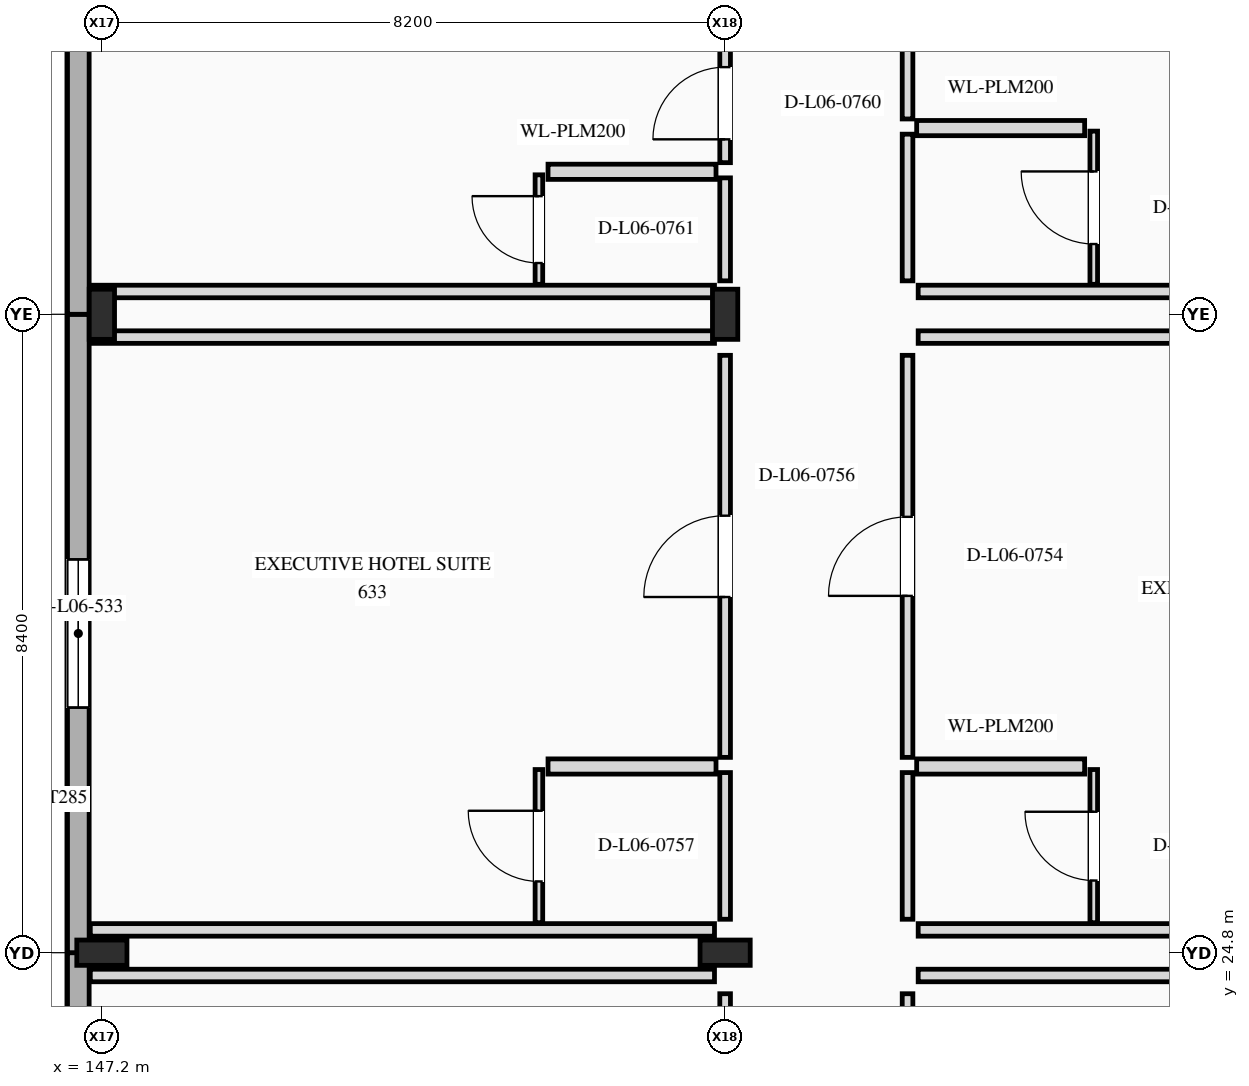
"""IFC4 building model, lengths in metres.
Left out: names, types, materials, properties, quantities, classifications, styles, units other than length and angle.
Written with IfcOpenShell. Run it as: python <this file> out.ifc"""

import sys

from ifc_helpers import new_model, si_unit, direction, frame, frame_2d, origin, origin_2d, place, context, subcontext, project, spatial, rectangle, i_section, extrude, element, fill, save


model = new_model("IFC4")
c1 = context("Model", 3, precision=1e-05, world=origin(), true_north=direction((0.0, 1.0)))
c2 = subcontext(c1, "Body", "Model", "MODEL_VIEW")
j1 = project(units=[si_unit("LENGTHUNIT", "METRE"), si_unit("PLANEANGLEUNIT", "RADIAN")], contexts=[c1])
p1 = place(None, origin())
s1 = spatial("IfcSite", under=j1, at=p1, CompositionType="ELEMENT")
p2 = place(p1, origin())
s2 = spatial("IfcBuilding", under=s1, at=p2, CompositionType="ELEMENT")
p3 = place(p2, frame((0.0, 0.0, 27.0)))
s3 = spatial("IfcBuildingStorey", under=s2, at=p3, CompositionType="ELEMENT", Elevation=27.0)
for number, where, z_axis, x_axis in (
    (1, (147.2, 24.8, 0.0), (0.0, 0.0, 1.0), (0.0, 1.0, 0.0)),
    (2, (147.2, 33.2, 0.0), (0.0, 0.0, 1.0), (1.0, 0.0, 0.0)),
    (3, (155.4, 24.8, 0.0), (0.0, 0.0, 1.0), (0.0, 1.0, 0.0)),
    (4, (155.4, 33.2, 0.0), (0.0, 0.0, 1.0), (1.0, 0.0, 0.0)),
):
    element("IfcColumn", number, at=place(p3, frame(where, z_axis=z_axis, x_axis=x_axis)), inside=s3, PredefinedType="COLUMN", context=c2, shape_type="SweptSolid", body=[
        extrude(i_section(OverallWidth=0.333, OverallDepth=0.66, WebThickness=0.024, FlangeThickness=0.044, at=origin_2d()), origin(), (0.0, 0.0, 1.0), 3.6),
    ])
p4 = place(p3, frame((146.89, 19.254, 0.0), z_axis=(0.0, 0.0, 1.0), x_axis=(0.0, 1.0, 0.0)))
e5 = element("IfcWall", 5, at=p4, inside=s3, PredefinedType="STANDARD", context=c2, shape_type="SweptSolid", body=[
    extrude(rectangle(XDim=5.546, YDim=0.285, at=frame_2d((2.773, 0.0))), origin(), (0.0, 0.0, 1.0), 3.6),
])
p5 = place(p4, frame((1.698, 0.0, 0.85)))
e6 = element("IfcOpeningElement", 6, at=p5, cuts=e5, PredefinedType="OPENING", context=c2, shape_type="SweptSolid", body=[
    extrude(rectangle(XDim=1.8, YDim=1.8, at=frame_2d((0.9, 0.9))), frame((0.0, 0.152, 0.0), z_axis=(0.0, -1.0, 0.0), x_axis=(1.0, 0.0, 0.0)), (0.0, 0.0, 1.0), 0.305),
])
p6 = place(p3, frame((146.89, 24.8, 0.0), z_axis=(0.0, 0.0, 1.0), x_axis=(0.0, 1.0, 0.0)))
e7 = element("IfcWall", 7, at=p6, inside=s3, PredefinedType="STANDARD", context=c2, shape_type="SweptSolid", body=[
    extrude(rectangle(XDim=8.4, YDim=0.285, at=frame_2d((4.2, 0.0))), origin(), (0.0, 0.0, 1.0), 3.6),
])
p7 = place(p6, frame((3.225, 0.0, 0.85)))
e8 = element("IfcOpeningElement", 8, at=p7, cuts=e7, PredefinedType="OPENING", context=c2, shape_type="SweptSolid", body=[
    extrude(rectangle(XDim=1.95, YDim=1.85, at=frame_2d((0.975, 0.925))), frame((0.0, 0.152, 0.0), z_axis=(0.0, -1.0, 0.0), x_axis=(1.0, 0.0, 0.0)), (0.0, 0.0, 1.0), 0.305),
])
p8 = place(p3, frame((146.89, 33.2, 0.0), z_axis=(0.0, 0.0, 1.0), x_axis=(0.0, 1.0, 0.0)))
e9 = element("IfcWall", 9, at=p8, inside=s3, PredefinedType="STANDARD", context=c2, shape_type="SweptSolid", body=[
    extrude(rectangle(XDim=8.4, YDim=0.285, at=frame_2d((4.2, 0.0))), origin(), (0.0, 0.0, 1.0), 3.6),
])
p9 = place(p3, frame((157.8, 21.37, 0.0), z_axis=(0.0, 0.0, 1.0), x_axis=(0.0, 1.0, 0.0)))
e10 = element("IfcWall", 10, at=p9, inside=s3, PredefinedType="PARTITIONING", context=c2, shape_type="SweptSolid", body=[
    extrude(rectangle(XDim=2.89, YDim=0.14, at=frame_2d((1.445, 0.0))), origin(), (0.0, 0.0, 1.0), 2.848),
])
p10 = place(p9, frame((0.955, 0.0, 0.0)))
e11 = element("IfcOpeningElement", 11, at=p10, cuts=e10, PredefinedType="OPENING", context=c2, shape_type="SweptSolid", body=[
    extrude(rectangle(XDim=0.98, YDim=2.2, at=frame_2d((0.49, 1.1))), frame((0.0, 0.08, 0.0), z_axis=(0.0, -1.0, 0.0), x_axis=(1.0, 0.0, 0.0)), (0.0, 0.0, 1.0), 0.16),
])
p11 = place(p3, frame((157.94, 24.5, 0.0), z_axis=(0.0, 0.0, 1.0), x_axis=(1.0, 0.0, 0.0)))
e12 = element("IfcWall", 12, at=p11, inside=s3, PredefinedType="PARTITIONING", context=c2, shape_type="SweptSolid", body=[
    extrude(rectangle(XDim=8.213, YDim=0.165, at=frame_2d((4.106, 0.0))), origin(), (0.0, 0.0, 1.0), 2.68),
])
p12 = place(p3, frame((155.4, 21.37, 0.0), z_axis=(0.0, 0.0, 1.0), x_axis=(0.0, 1.0, 0.0)))
e13 = element("IfcWall", 13, at=p12, inside=s3, PredefinedType="PARTITIONING", context=c2, shape_type="SweptSolid", body=[
    extrude(rectangle(XDim=2.89, YDim=0.14, at=frame_2d((1.445, 0.0))), origin(), (0.0, 0.0, 1.0), 2.764),
])
p13 = place(p12, frame((0.94, 0.0, 0.0)))
e14 = element("IfcOpeningElement", 14, at=p13, cuts=e13, PredefinedType="OPENING", context=c2, shape_type="SweptSolid", body=[
    extrude(rectangle(XDim=1.01, YDim=2.2, at=frame_2d((0.505, 1.1))), frame((0.0, 0.08, 0.0), z_axis=(0.0, -1.0, 0.0), x_axis=(1.0, 0.0, 0.0)), (0.0, 0.0, 1.0), 0.16),
])
p14 = place(p3, frame((147.048, 24.5, 0.0), z_axis=(0.0, 0.0, 1.0), x_axis=(1.0, 0.0, 0.0)))
e15 = element("IfcWall", 15, at=p14, inside=s3, PredefinedType="PARTITIONING", context=c2, shape_type="SweptSolid", body=[
    extrude(rectangle(XDim=8.212, YDim=0.165, at=frame_2d((4.106, 0.0))), origin(), (0.0, 0.0, 1.0), 2.703),
])
p15 = place(p3, frame((157.8, 25.24, 0.0), z_axis=(0.0, 0.0, 1.0), x_axis=(0.0, 1.0, 0.0)))
e16 = element("IfcWall", 16, at=p15, inside=s3, PredefinedType="PARTITIONING", context=c2, shape_type="SweptSolid", body=[
    extrude(rectangle(XDim=1.93, YDim=0.14, at=frame_2d((0.965, 0.0))), origin(), (0.0, 0.0, 1.0), 2.848),
])
p16 = place(p3, frame((157.8, 27.37, 0.0), z_axis=(0.0, 0.0, 1.0), x_axis=(0.0, 1.0, 0.0)))
e17 = element("IfcWall", 17, at=p16, inside=s3, PredefinedType="PARTITIONING", context=c2, shape_type="SweptSolid", body=[
    extrude(rectangle(XDim=5.29, YDim=0.14, at=frame_2d((2.645, 0.0))), origin(), (0.0, 0.0, 1.0), 2.848),
])
p17 = place(p16, frame((2.125, 0.0, 0.0)))
e18 = element("IfcOpeningElement", 18, at=p17, cuts=e17, PredefinedType="OPENING", context=c2, shape_type="SweptSolid", body=[
    extrude(rectangle(XDim=1.04, YDim=2.25, at=frame_2d((0.52, 1.125))), frame((0.0, 0.08, 0.0), z_axis=(0.0, -1.0, 0.0), x_axis=(1.0, 0.0, 0.0)), (0.0, 0.0, 1.0), 0.16),
])
for number, where, z_axis, x_axis in (
    (19, (157.94, 25.1, 0.0), (0.0, 0.0, 1.0), (1.0, 0.0, 0.0)),
    (20, (157.94, 32.9, 0.0), (0.0, 0.0, 1.0), (1.0, 0.0, 0.0)),
):
    element("IfcWall", number, at=place(p3, frame(where, z_axis=z_axis, x_axis=x_axis)), inside=s3, PredefinedType="PARTITIONING", context=c2, shape_type="SweptSolid", body=[
        extrude(rectangle(XDim=8.213, YDim=0.165, at=frame_2d((4.106, 0.0))), origin(), (0.0, 0.0, 1.0), 2.68),
    ])
p18 = place(p3, frame((157.92, 27.25, 0.0), z_axis=(0.0, 0.0, 1.0), x_axis=(1.0, 0.0, 0.0)))
e21 = element("IfcWall", 21, at=p18, inside=s3, PredefinedType="PLUMBINGWALL", context=c2, shape_type="SweptSolid", body=[
    extrude(rectangle(XDim=2.21, YDim=0.2, at=frame_2d((1.105, 0.0))), origin(), (0.0, 0.0, 1.0), 3.29),
])
p19 = place(p3, frame((160.25, 25.195, 0.0), z_axis=(0.0, 0.0, 1.0), x_axis=(0.0, 1.0, 0.0)))
e22 = element("IfcWall", 22, at=p19, inside=s3, PredefinedType="PARTITIONING", context=c2, shape_type="SweptSolid", body=[
    extrude(rectangle(XDim=2.015, YDim=0.1, at=frame_2d((1.008, 0.0))), origin(), (0.0, 0.0, 1.0), 2.848),
])
p20 = place(p19, frame((0.555, 0.0, 0.0)))
e23 = element("IfcOpeningElement", 23, at=p20, cuts=e22, PredefinedType="OPENING", context=c2, shape_type="SweptSolid", body=[
    extrude(rectangle(XDim=0.905, YDim=2.18, at=frame_2d((0.453, 1.09))), frame((0.0, 0.06, 0.0), z_axis=(0.0, -1.0, 0.0), x_axis=(1.0, 0.0, 0.0)), (0.0, 0.0, 1.0), 0.12),
])
p21 = place(p3, frame((155.4, 25.24, 0.0), z_axis=(0.0, 0.0, 1.0), x_axis=(0.0, 1.0, 0.0)))
e24 = element("IfcWall", 24, at=p21, inside=s3, PredefinedType="PARTITIONING", context=c2, shape_type="SweptSolid", body=[
    extrude(rectangle(XDim=1.93, YDim=0.14, at=frame_2d((0.965, 0.0))), origin(), (0.0, 0.0, 1.0), 2.764),
])
p22 = place(p3, frame((155.4, 27.37, 0.0), z_axis=(0.0, 0.0, 1.0), x_axis=(0.0, 1.0, 0.0)))
e25 = element("IfcWall", 25, at=p22, inside=s3, PredefinedType="PARTITIONING", context=c2, shape_type="SweptSolid", body=[
    extrude(rectangle(XDim=5.29, YDim=0.14, at=frame_2d((2.645, 0.0))), origin(), (0.0, 0.0, 1.0), 2.764),
])
p23 = place(p22, frame((2.11, 0.0, 0.0)))
e26 = element("IfcOpeningElement", 26, at=p23, cuts=e25, PredefinedType="OPENING", context=c2, shape_type="SweptSolid", body=[
    extrude(rectangle(XDim=1.07, YDim=2.25, at=frame_2d((0.535, 1.125))), frame((0.0, 0.08, 0.0), z_axis=(0.0, -1.0, 0.0), x_axis=(1.0, 0.0, 0.0)), (0.0, 0.0, 1.0), 0.16),
])
for number, where, z_axis, x_axis in (
    (27, (147.048, 25.1, 0.0), (0.0, 0.0, 1.0), (1.0, 0.0, 0.0)),
    (28, (147.048, 32.9, 0.0), (0.0, 0.0, 1.0), (1.0, 0.0, 0.0)),
):
    element("IfcWall", number, at=place(p3, frame(where, z_axis=z_axis, x_axis=x_axis)), inside=s3, PredefinedType="PARTITIONING", context=c2, shape_type="SweptSolid", body=[
        extrude(rectangle(XDim=8.212, YDim=0.165, at=frame_2d((4.106, 0.0))), origin(), (0.0, 0.0, 1.0), 2.703),
    ])
p24 = place(p3, frame((153.07, 27.25, 0.0), z_axis=(0.0, 0.0, 1.0), x_axis=(1.0, 0.0, 0.0)))
e29 = element("IfcWall", 29, at=p24, inside=s3, PredefinedType="PLUMBINGWALL", context=c2, shape_type="SweptSolid", body=[
    extrude(rectangle(XDim=2.21, YDim=0.2, at=frame_2d((1.105, 0.0))), origin(), (0.0, 0.0, 1.0), 3.29),
])
p25 = place(p3, frame((152.95, 25.195, 0.0), z_axis=(0.0, 0.0, 1.0), x_axis=(0.0, 1.0, 0.0)))
e30 = element("IfcWall", 30, at=p25, inside=s3, PredefinedType="PARTITIONING", context=c2, shape_type="SweptSolid", body=[
    extrude(rectangle(XDim=2.015, YDim=0.1, at=frame_2d((1.008, 0.0))), origin(), (0.0, 0.0, 1.0), 2.898),
])
p26 = place(p25, frame((0.543, 0.0, 0.0)))
e31 = element("IfcOpeningElement", 31, at=p26, cuts=e30, PredefinedType="OPENING", context=c2, shape_type="SweptSolid", body=[
    extrude(rectangle(XDim=0.93, YDim=2.22, at=frame_2d((0.465, 1.11))), frame((0.0, 0.06, 0.0), z_axis=(0.0, -1.0, 0.0), x_axis=(1.0, 0.0, 0.0)), (0.0, 0.0, 1.0), 0.12),
])
p27 = place(p3, frame((157.8, 33.64, 0.0), z_axis=(0.0, 0.0, 1.0), x_axis=(0.0, 1.0, 0.0)))
e32 = element("IfcWall", 32, at=p27, inside=s3, PredefinedType="PARTITIONING", context=c2, shape_type="SweptSolid", body=[
    extrude(rectangle(XDim=1.93, YDim=0.14, at=frame_2d((0.965, 0.0))), origin(), (0.0, 0.0, 1.0), 2.843),
])
p28 = place(p3, frame((157.8, 35.77, 0.0), z_axis=(0.0, 0.0, 1.0), x_axis=(0.0, 1.0, 0.0)))
e33 = element("IfcWall", 33, at=p28, inside=s3, PredefinedType="PARTITIONING", context=c2, shape_type="SweptSolid", body=[
    extrude(rectangle(XDim=5.29, YDim=0.14, at=frame_2d((2.645, 0.0))), origin(), (0.0, 0.0, 1.0), 2.843),
])
p29 = place(p28, frame((2.185, 0.0, 0.0)))
e34 = element("IfcOpeningElement", 34, at=p29, cuts=e33, PredefinedType="OPENING", context=c2, shape_type="SweptSolid", body=[
    extrude(rectangle(XDim=0.92, YDim=2.3, at=frame_2d((0.46, 1.15))), frame((0.0, 0.08, 0.0), z_axis=(0.0, -1.0, 0.0), x_axis=(1.0, 0.0, 0.0)), (0.0, 0.0, 1.0), 0.16),
])
p30 = place(p3, frame((157.94, 33.5, 0.0), z_axis=(0.0, 0.0, 1.0), x_axis=(1.0, 0.0, 0.0)))
e35 = element("IfcWall", 35, at=p30, inside=s3, PredefinedType="PARTITIONING", context=c2, shape_type="SweptSolid", body=[
    extrude(rectangle(XDim=8.213, YDim=0.165, at=frame_2d((4.106, 0.0))), origin(), (0.0, 0.0, 1.0), 2.68),
])
p31 = place(p3, frame((157.92, 35.65, 0.0), z_axis=(0.0, 0.0, 1.0), x_axis=(1.0, 0.0, 0.0)))
e36 = element("IfcWall", 36, at=p31, inside=s3, PredefinedType="PLUMBINGWALL", context=c2, shape_type="SweptSolid", body=[
    extrude(rectangle(XDim=2.21, YDim=0.2, at=frame_2d((1.105, 0.0))), origin(), (0.0, 0.0, 1.0), 3.29),
])
p32 = place(p3, frame((160.25, 33.594, 0.0), z_axis=(0.0, 0.0, 1.0), x_axis=(0.0, 1.0, 0.0)))
e37 = element("IfcWall", 37, at=p32, inside=s3, PredefinedType="PARTITIONING", context=c2, shape_type="SweptSolid", body=[
    extrude(rectangle(XDim=2.016, YDim=0.1, at=frame_2d((1.008, 0.0))), origin(), (0.0, 0.0, 1.0), 2.843),
])
p33 = place(p32, frame((0.53, 0.0, 0.0)))
e38 = element("IfcOpeningElement", 38, at=p33, cuts=e37, PredefinedType="OPENING", context=c2, shape_type="SweptSolid", body=[
    extrude(rectangle(XDim=0.955, YDim=2.22, at=frame_2d((0.478, 1.11))), frame((0.0, 0.06, 0.0), z_axis=(0.0, -1.0, 0.0), x_axis=(1.0, 0.0, 0.0)), (0.0, 0.0, 1.0), 0.12),
])
p34 = place(p3, frame((155.4, 33.64, 0.0), z_axis=(0.0, 0.0, 1.0), x_axis=(0.0, 1.0, 0.0)))
e39 = element("IfcWall", 39, at=p34, inside=s3, PredefinedType="PARTITIONING", context=c2, shape_type="SweptSolid", body=[
    extrude(rectangle(XDim=1.355, YDim=0.14, at=frame_2d((0.678, 0.0))), origin(), (0.0, 0.0, 1.0), 2.68),
])
p35 = place(p3, frame((155.4, 35.195, 0.0), z_axis=(0.0, 0.0, 1.0), x_axis=(0.0, 1.0, 0.0)))
e40 = element("IfcWall", 40, at=p35, inside=s3, PredefinedType="PARTITIONING", context=c2, shape_type="SweptSolid", body=[
    extrude(rectangle(XDim=1.565, YDim=0.14, at=frame_2d((0.782, 0.0))), origin(), (0.0, 0.0, 1.0), 2.68),
])
p36 = place(p35, frame((0.307, 0.0, 0.0)))
e41 = element("IfcOpeningElement", 41, at=p36, cuts=e40, PredefinedType="OPENING", context=c2, shape_type="SweptSolid", body=[
    extrude(rectangle(XDim=0.95, YDim=2.3, at=frame_2d((0.475, 1.15))), frame((0.0, 0.08, 0.0), z_axis=(0.0, -1.0, 0.0), x_axis=(1.0, 0.0, 0.0)), (0.0, 0.0, 1.0), 0.16),
])
p37 = place(p3, frame((147.048, 33.5, 0.0), z_axis=(0.0, 0.0, 1.0), x_axis=(1.0, 0.0, 0.0)))
e42 = element("IfcWall", 42, at=p37, inside=s3, PredefinedType="PARTITIONING", context=c2, shape_type="SweptSolid", body=[
    extrude(rectangle(XDim=8.212, YDim=0.165, at=frame_2d((4.106, 0.0))), origin(), (0.0, 0.0, 1.0), 2.703),
])
p38 = place(p3, frame((153.07, 35.075, 0.0), z_axis=(0.0, 0.0, 1.0), x_axis=(1.0, 0.0, 0.0)))
e43 = element("IfcWall", 43, at=p38, inside=s3, PredefinedType="PLUMBINGWALL", context=c2, shape_type="SweptSolid", body=[
    extrude(rectangle(XDim=2.21, YDim=0.2, at=frame_2d((1.105, 0.0))), origin(), (0.0, 0.0, 1.0), 3.29),
])
p39 = place(p3, frame((152.95, 33.594, 0.0), z_axis=(0.0, 0.0, 1.0), x_axis=(0.0, 1.0, 0.0)))
e44 = element("IfcWall", 44, at=p39, inside=s3, PredefinedType="PARTITIONING", context=c2, shape_type="SweptSolid", body=[
    extrude(rectangle(XDim=1.44, YDim=0.1, at=frame_2d((0.72, 0.0))), origin(), (0.0, 0.0, 1.0), 3.29),
])
p40 = place(p39, frame((0.28, 0.0, 0.0)))
e45 = element("IfcOpeningElement", 45, at=p40, cuts=e44, PredefinedType="OPENING", context=c2, shape_type="SweptSolid", body=[
    extrude(rectangle(XDim=0.88, YDim=2.1, at=frame_2d((0.44, 1.05))), frame((0.0, 0.06, 0.0), z_axis=(0.0, -1.0, 0.0), x_axis=(1.0, 0.0, 0.0)), (0.0, 0.0, 1.0), 0.12),
])
p41 = place(p7, origin())
e46 = element("IfcWindow", 46, at=p41, inside=s3, PartitioningType="SINGLE_PANEL", PredefinedType="WINDOW", context=c2, shape_type="SweptSolid", body=[
    extrude(rectangle(XDim=1.95, YDim=1.85, at=frame_2d((0.975, 0.925))), frame((0.0, 0.03, 0.0), z_axis=(0.0, -1.0, 0.0), x_axis=(1.0, 0.0, 0.0)), (0.0, 0.0, 1.0), 0.06),
])
fill(e8, e46)
p42 = place(p17, origin())
e47 = element("IfcDoor", 47, at=p42, inside=s3, OperationType="SINGLE_SWING_LEFT", PredefinedType="DOOR", context=c2, shape_type="SweptSolid", body=[
    extrude(rectangle(XDim=1.04, YDim=2.25, at=frame_2d((0.52, 1.125))), frame((0.0, 0.025, 0.0), z_axis=(0.0, -1.0, 0.0), x_axis=(1.0, 0.0, 0.0)), (0.0, 0.0, 1.0), 0.05),
])
fill(e18, e47)
p43 = place(p20, origin())
e48 = element("IfcDoor", 48, at=p43, inside=s3, OperationType="SINGLE_SWING_RIGHT", PredefinedType="DOOR", context=c2, shape_type="SweptSolid", body=[
    extrude(rectangle(XDim=0.905, YDim=2.18, at=frame_2d((0.453, 1.09))), frame((0.0, 0.025, 0.0), z_axis=(0.0, -1.0, 0.0), x_axis=(1.0, 0.0, 0.0)), (0.0, 0.0, 1.0), 0.05),
])
fill(e23, e48)
p44 = place(p23, origin())
e49 = element("IfcDoor", 49, at=p44, inside=s3, OperationType="SINGLE_SWING_LEFT", PredefinedType="DOOR", context=c2, shape_type="SweptSolid", body=[
    extrude(rectangle(XDim=1.07, YDim=2.25, at=frame_2d((0.535, 1.125))), frame((0.0, 0.025, 0.0), z_axis=(0.0, -1.0, 0.0), x_axis=(1.0, 0.0, 0.0)), (0.0, 0.0, 1.0), 0.05),
])
fill(e26, e49)
p45 = place(p26, origin())
e50 = element("IfcDoor", 50, at=p45, inside=s3, OperationType="SINGLE_SWING_RIGHT", PredefinedType="DOOR", context=c2, shape_type="SweptSolid", body=[
    extrude(rectangle(XDim=0.93, YDim=2.22, at=frame_2d((0.465, 1.11))), frame((0.0, 0.025, 0.0), z_axis=(0.0, -1.0, 0.0), x_axis=(1.0, 0.0, 0.0)), (0.0, 0.0, 1.0), 0.05),
])
fill(e31, e50)
p46 = place(p33, origin())
e51 = element("IfcDoor", 51, at=p46, inside=s3, OperationType="SINGLE_SWING_RIGHT", PredefinedType="DOOR", context=c2, shape_type="SweptSolid", body=[
    extrude(rectangle(XDim=0.955, YDim=2.22, at=frame_2d((0.478, 1.11))), frame((0.0, 0.025, 0.0), z_axis=(0.0, -1.0, 0.0), x_axis=(1.0, 0.0, 0.0)), (0.0, 0.0, 1.0), 0.05),
])
fill(e38, e51)
p47 = place(p36, origin())
e52 = element("IfcDoor", 52, at=p47, inside=s3, OperationType="SINGLE_SWING_LEFT", PredefinedType="DOOR", context=c2, shape_type="SweptSolid", body=[
    extrude(rectangle(XDim=0.95, YDim=2.3, at=frame_2d((0.475, 1.15))), frame((0.0, 0.025, 0.0), z_axis=(0.0, -1.0, 0.0), x_axis=(1.0, 0.0, 0.0)), (0.0, 0.0, 1.0), 0.05),
])
fill(e41, e52)
p48 = place(p40, origin())
e53 = element("IfcDoor", 53, at=p48, inside=s3, OperationType="SINGLE_SWING_RIGHT", PredefinedType="DOOR", context=c2, shape_type="SweptSolid", body=[
    extrude(rectangle(XDim=0.88, YDim=2.1, at=frame_2d((0.44, 1.05))), frame((0.0, 0.025, 0.0), z_axis=(0.0, -1.0, 0.0), x_axis=(1.0, 0.0, 0.0)), (0.0, 0.0, 1.0), 0.05),
])
fill(e45, e53)
save(model, sys.argv[1])
